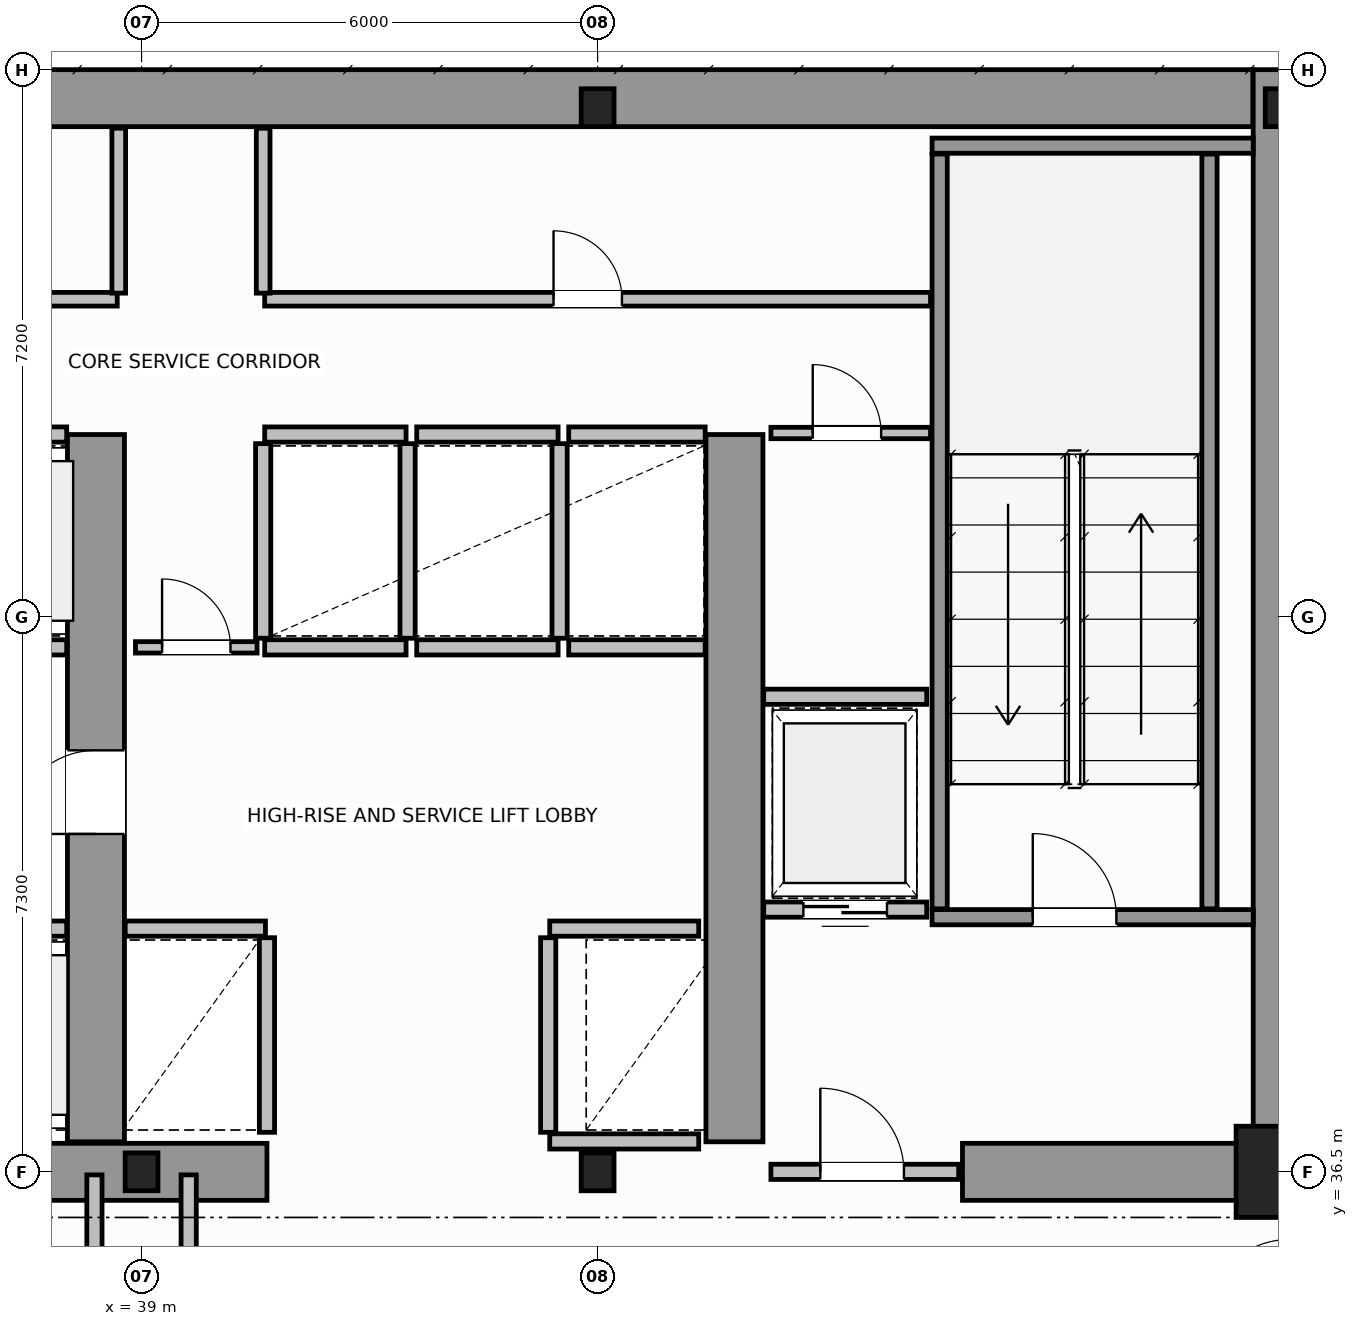
"""IFC4 building model, lengths in metres.
Left out: names, types, materials, properties, quantities, classifications, styles, units other than length and angle.
Written with IfcOpenShell. Run it as: python <this file> out.ifc"""

import sys

from ifc_helpers import new_model, si_unit, direction, frame, frame_2d, origin, origin_2d, place, context, subcontext, project, spatial, rectangle, i_section, extrude, source, transform, mapped, element, fill, save


model = new_model("IFC4")
c1 = context("Model", 3, precision=1e-05, world=origin(), true_north=direction((0.0, 1.0)))
c2 = subcontext(c1, "Body", "Model", "MODEL_VIEW")
j1 = project(units=[si_unit("LENGTHUNIT", "METRE"), si_unit("PLANEANGLEUNIT", "RADIAN")], contexts=[c1])
p1 = place(None, origin())
s1 = spatial("IfcSite", under=j1, at=p1, CompositionType="ELEMENT")
p2 = place(p1, origin())
s2 = spatial("IfcBuilding", under=s1, at=p2, CompositionType="ELEMENT")
p3 = place(p2, frame((0.0, 0.0, 149.0)))
s3 = spatial("IfcBuildingStorey", under=s2, at=p3, CompositionType="ELEMENT", Elevation=149.0)
m1 = source(origin(), c2, "Body", "SweptSolid", [
    extrude(i_section(OverallWidth=0.432, OverallDepth=0.498, WebThickness=0.055, FlangeThickness=0.068, FilletRadius=0.015, at=origin_2d()), origin(), (0.0, 0.0, 1.0), 4.8),
])
for number, where, z_axis, x_axis in (
    (1, (39.0, 36.5, 0.0), (0.0, 0.0, 1.0), (1.0, 0.0, 0.0)),
    (2, (45.0, 36.5, 0.0), (0.0, 0.0, 1.0), (1.0, 0.0, 0.0)),
):
    element("IfcColumn", number, at=place(p3, frame(where, z_axis=z_axis, x_axis=x_axis)), inside=s3, PredefinedType="COLUMN", context=c2, shape_type="MappedRepresentation", body=[
        mapped(m1, transform((0.0, 0.0, 0.0), scale=1.0)),
    ])
m2 = source(origin(), c2, "Body", "SweptSolid", [
    extrude(rectangle(XDim=1.2, YDim=1.2, at=origin_2d()), origin(), (0.0, 0.0, 1.0), 4.8),
])
p4 = place(p3, frame((54.0, 36.5, 0.0), z_axis=(0.0, 0.0, 1.0), x_axis=(1.0, 0.0, 0.0)))
e3 = element("IfcColumn", 3, at=p4, inside=s3, PredefinedType="COLUMN", context=c2, shape_type="MappedRepresentation", body=[
    mapped(m2, transform((0.0, 0.0, 0.0), scale=1.0)),
])
for number, where, z_axis, x_axis in (
    (4, (45.0, 50.5, 0.0), (0.0, 0.0, 1.0), (1.0, 0.0, 0.0)),
    (5, (54.0, 50.5, 0.0), (0.0, 0.0, 1.0), (1.0, 0.0, 0.0)),
):
    element("IfcColumn", number, at=place(p3, frame(where, z_axis=z_axis, x_axis=x_axis)), inside=s3, PredefinedType="COLUMN", context=c2, shape_type="MappedRepresentation", body=[
        mapped(m1, transform((0.0, 0.0, 0.0), scale=1.0)),
    ])
p5 = place(p3, frame((34.002, 50.625, 0.0), z_axis=(0.0, 0.0, 1.0), x_axis=(1.0, 0.0, 0.0)))
e6 = element("IfcWall", 6, at=p5, inside=s3, PredefinedType="SHEAR", context=c2, shape_type="SweptSolid", body=[
    extrude(rectangle(XDim=19.619, YDim=0.75, at=frame_2d((9.81, 0.0))), origin(), (0.0, 0.0, 1.0), 4.8),
])
p6 = place(p3, frame((54.0, 36.5, 0.0), z_axis=(0.0, 0.0, 1.0), x_axis=(0.0, 1.0, 0.0)))
e7 = element("IfcWall", 7, at=p6, inside=s3, PredefinedType="SHEAR", context=c2, shape_type="SweptSolid", body=[
    extrude(rectangle(XDim=14.5, YDim=0.75, at=frame_2d((7.25, 0.0))), origin(), (0.0, 0.0, 1.0), 4.8),
])
p7 = place(p3, frame((36.15, 36.5, 0.0), z_axis=(0.0, 0.0, 1.0), x_axis=(1.0, 0.0, 0.0)))
e8 = element("IfcWall", 8, at=p7, inside=s3, PredefinedType="SHEAR", context=c2, shape_type="SweptSolid", body=[
    extrude(rectangle(XDim=4.5, YDim=0.75, at=frame_2d((2.25, 0.0))), origin(), (0.0, 0.0, 1.0), 4.8),
])
p8 = place(p3, frame((49.8, 36.5, 0.0), z_axis=(0.0, 0.0, 1.0), x_axis=(1.0, 0.0, 0.0)))
e9 = element("IfcWall", 9, at=p8, inside=s3, PredefinedType="SHEAR", context=c2, shape_type="SweptSolid", body=[
    extrude(rectangle(XDim=3.805, YDim=0.75, at=frame_2d((1.902, 0.0))), origin(), (0.0, 0.0, 1.0), 3.34),
])
p9 = place(p3, frame((38.4, 36.895, 0.0), z_axis=(0.0, 0.0, 1.0), x_axis=(0.0, 1.0, 0.0)))
e10 = element("IfcWall", 10, at=p9, inside=s3, PredefinedType="SHEAR", context=c2, shape_type="SweptSolid", body=[
    extrude(rectangle(XDim=9.305, YDim=0.75, at=frame_2d((4.652, 0.0))), origin(), (0.0, 0.0, 1.0), 4.8),
])
p10 = place(p9, frame((4.05, 0.0, 0.0)))
e11 = element("IfcOpeningElement", 11, at=p10, cuts=e10, PredefinedType="OPENING", context=c2, shape_type="SweptSolid", body=[
    extrude(rectangle(XDim=1.1, YDim=2.15, at=frame_2d((0.55, 1.075))), frame((0.0, 0.385, 0.0), z_axis=(0.0, -1.0, 0.0), x_axis=(1.0, 0.0, 0.0)), (0.0, 0.0, 1.0), 0.77),
])
p11 = place(p3, frame((46.8, 36.895, 0.0), z_axis=(0.0, 0.0, 1.0), x_axis=(0.0, 1.0, 0.0)))
e12 = element("IfcWall", 12, at=p11, inside=s3, PredefinedType="SHEAR", context=c2, shape_type="SweptSolid", body=[
    extrude(rectangle(XDim=9.305, YDim=0.75, at=frame_2d((4.652, 0.0))), origin(), (0.0, 0.0, 1.0), 4.8),
])
p12 = place(p3, frame((49.4, 39.85, 0.0), z_axis=(0.0, 0.0, 1.0), x_axis=(1.0, 0.0, 0.0)))
e13 = element("IfcWall", 13, at=p12, inside=s3, PredefinedType="SOLIDWALL", context=c2, shape_type="SweptSolid", body=[
    extrude(rectangle(XDim=4.225, YDim=0.2, at=frame_2d((2.113, 0.0))), origin(), (0.0, 0.0, 1.0), 4.8),
])
p13 = place(p12, frame((1.325, 0.0, 0.0)))
e14 = element("IfcOpeningElement", 14, at=p13, cuts=e13, PredefinedType="OPENING", context=c2, shape_type="SweptSolid", body=[
    extrude(rectangle(XDim=1.1, YDim=2.15, at=frame_2d((0.55, 1.075))), frame((0.0, 0.11, 0.0), z_axis=(0.0, -1.0, 0.0), x_axis=(1.0, 0.0, 0.0)), (0.0, 0.0, 1.0), 0.22),
])
p14 = place(p3, frame((49.4, 50.0, 0.0), z_axis=(0.0, 0.0, 1.0), x_axis=(1.0, 0.0, 0.0)))
e15 = element("IfcWall", 15, at=p14, inside=s3, PredefinedType="SOLIDWALL", context=c2, shape_type="SweptSolid", body=[
    extrude(rectangle(XDim=4.225, YDim=0.2, at=frame_2d((2.113, 0.0))), origin(), (0.0, 0.0, 1.0), 4.8),
])
for number, where, z_axis, x_axis in (
    (16, (49.5, 39.96, 0.0), (0.0, 0.0, 1.0), (0.0, 1.0, 0.0)),
    (17, (53.05, 39.96, 0.0), (0.0, 0.0, 1.0), (0.0, 1.0, 0.0)),
):
    element("IfcWall", number, at=place(p3, frame(where, z_axis=z_axis, x_axis=x_axis)), inside=s3, PredefinedType="SOLIDWALL", context=c2, shape_type="SweptSolid", body=[
        extrude(rectangle(XDim=9.93, YDim=0.2, at=frame_2d((4.965, 0.0))), origin(), (0.0, 0.0, 1.0), 4.8),
    ])
p15 = place(p3, frame((47.28, 36.5, 0.0), z_axis=(0.0, 0.0, 1.0), x_axis=(1.0, 0.0, 0.0)))
e18 = element("IfcWall", 18, at=p15, inside=s3, PredefinedType="SOLIDWALL", context=c2, shape_type="SweptSolid", body=[
    extrude(rectangle(XDim=2.47, YDim=0.2, at=frame_2d((1.235, 0.0))), origin(), (0.0, 0.0, 1.0), 3.33),
])
p16 = place(p15, frame((0.65, 0.0, 0.0)))
e19 = element("IfcOpeningElement", 19, at=p16, cuts=e18, PredefinedType="OPENING", context=c2, shape_type="SweptSolid", body=[
    extrude(rectangle(XDim=1.1, YDim=2.15, at=frame_2d((0.55, 1.075))), frame((0.0, 0.11, 0.0), z_axis=(0.0, -1.0, 0.0), x_axis=(1.0, 0.0, 0.0)), (0.0, 0.0, 1.0), 0.22),
])
p17 = place(p3, frame((36.17, 39.7, 0.0), z_axis=(0.0, 0.0, 1.0), x_axis=(1.0, 0.0, 0.0)))
e20 = element("IfcWall", 20, at=p17, inside=s3, PredefinedType="SOLIDWALL", context=c2, shape_type="SweptSolid", body=[
    extrude(rectangle(XDim=1.845, YDim=0.2, at=frame_2d((0.922, 0.0))), origin(), (0.0, 0.0, 1.0), 4.54),
])
p18 = place(p17, frame((0.372, 0.0, 0.0)))
e21 = element("IfcOpeningElement", 21, at=p18, cuts=e20, PredefinedType="OPENING", context=c2, shape_type="SweptSolid", body=[
    extrude(rectangle(XDim=1.1, YDim=2.15, at=frame_2d((0.55, 1.075))), frame((0.0, 0.11, 0.0), z_axis=(0.0, -1.0, 0.0), x_axis=(1.0, 0.0, 0.0)), (0.0, 0.0, 1.0), 0.22),
])
p19 = place(p3, frame((36.29, 43.4, 0.0), z_axis=(0.0, 0.0, 1.0), x_axis=(1.0, 0.0, 0.0)))
e22 = element("IfcWall", 22, at=p19, inside=s3, PredefinedType="SOLIDWALL", context=c2, shape_type="SweptSolid", body=[
    extrude(rectangle(XDim=1.725, YDim=0.2, at=frame_2d((0.862, 0.0))), origin(), (0.0, 0.0, 1.0), 4.54),
])
p20 = place(p19, frame((0.313, 0.0, 0.0)))
e23 = element("IfcOpeningElement", 23, at=p20, cuts=e22, PredefinedType="OPENING", context=c2, shape_type="SweptSolid", body=[
    extrude(rectangle(XDim=1.1, YDim=2.15, at=frame_2d((0.55, 1.075))), frame((0.0, 0.11, 0.0), z_axis=(0.0, -1.0, 0.0), x_axis=(1.0, 0.0, 0.0)), (0.0, 0.0, 1.0), 0.22),
])
p21 = place(p3, frame((36.29, 46.2, 0.0), z_axis=(0.0, 0.0, 1.0), x_axis=(1.0, 0.0, 0.0)))
e24 = element("IfcWall", 24, at=p21, inside=s3, PredefinedType="SOLIDWALL", context=c2, shape_type="SweptSolid", body=[
    extrude(rectangle(XDim=1.725, YDim=0.2, at=frame_2d((0.862, 0.0))), origin(), (0.0, 0.0, 1.0), 4.54),
])
p22 = place(p3, frame((38.785, 39.7, 0.0), z_axis=(0.0, 0.0, 1.0), x_axis=(1.0, 0.0, 0.0)))
e25 = element("IfcWall", 25, at=p22, inside=s3, PredefinedType="SOLIDWALL", context=c2, shape_type="SweptSolid", body=[
    extrude(rectangle(XDim=1.845, YDim=0.2, at=frame_2d((0.922, 0.0))), origin(), (0.0, 0.0, 1.0), 4.54),
])
p23 = place(p3, frame((40.65, 37.02, 0.0), z_axis=(0.0, 0.0, 1.0), x_axis=(0.0, 1.0, 0.0)))
e26 = element("IfcWall", 26, at=p23, inside=s3, PredefinedType="SOLIDWALL", context=c2, shape_type="SweptSolid", body=[
    extrude(rectangle(XDim=2.56, YDim=0.2, at=frame_2d((1.28, 0.0))), origin(), (0.0, 0.0, 1.0), 4.54),
])
p24 = place(p3, frame((44.37, 39.7, 0.0), z_axis=(0.0, 0.0, 1.0), x_axis=(1.0, 0.0, 0.0)))
e27 = element("IfcWall", 27, at=p24, inside=s3, PredefinedType="SOLIDWALL", context=c2, shape_type="SweptSolid", body=[
    extrude(rectangle(XDim=1.96, YDim=0.2, at=frame_2d((0.98, 0.0))), origin(), (0.0, 0.0, 1.0), 4.54),
])
p25 = place(p3, frame((44.37, 36.9, 0.0), z_axis=(0.0, 0.0, 1.0), x_axis=(1.0, 0.0, 0.0)))
e28 = element("IfcWall", 28, at=p25, inside=s3, PredefinedType="SOLIDWALL", context=c2, shape_type="SweptSolid", body=[
    extrude(rectangle(XDim=1.96, YDim=0.2, at=frame_2d((0.98, 0.0))), origin(), (0.0, 0.0, 1.0), 3.33),
])
p26 = place(p3, frame((44.35, 37.02, 0.0), z_axis=(0.0, 0.0, 1.0), x_axis=(0.0, 1.0, 0.0)))
e29 = element("IfcWall", 29, at=p26, inside=s3, PredefinedType="SOLIDWALL", context=c2, shape_type="SweptSolid", body=[
    extrude(rectangle(XDim=2.56, YDim=0.2, at=frame_2d((1.28, 0.0))), origin(), (0.0, 0.0, 1.0), 4.54),
])
for number, where, z_axis, x_axis in (
    (30, (40.62, 43.4, 0.0), (0.0, 0.0, 1.0), (1.0, 0.0, 0.0)),
    (31, (40.62, 46.2, 0.0), (0.0, 0.0, 1.0), (1.0, 0.0, 0.0)),
):
    element("IfcWall", number, at=place(p3, frame(where, z_axis=z_axis, x_axis=x_axis)), inside=s3, PredefinedType="SOLIDWALL", context=c2, shape_type="SweptSolid", body=[
        extrude(rectangle(XDim=1.86, YDim=0.2, at=frame_2d((0.93, 0.0))), origin(), (0.0, 0.0, 1.0), 4.54),
    ])
for number, where, z_axis, x_axis in (
    (32, (40.6, 43.52, 0.0), (0.0, 0.0, 1.0), (0.0, 1.0, 0.0)),
    (33, (42.5, 43.52, 0.0), (0.0, 0.0, 1.0), (0.0, 1.0, 0.0)),
):
    element("IfcWall", number, at=place(p3, frame(where, z_axis=z_axis, x_axis=x_axis)), inside=s3, PredefinedType="SOLIDWALL", context=c2, shape_type="SweptSolid", body=[
        extrude(rectangle(XDim=2.56, YDim=0.2, at=frame_2d((1.28, 0.0))), origin(), (0.0, 0.0, 1.0), 4.54),
    ])
for number, where, z_axis, x_axis in (
    (34, (42.62, 43.4, 0.0), (0.0, 0.0, 1.0), (1.0, 0.0, 0.0)),
    (35, (42.62, 46.2, 0.0), (0.0, 0.0, 1.0), (1.0, 0.0, 0.0)),
):
    element("IfcWall", number, at=place(p3, frame(where, z_axis=z_axis, x_axis=x_axis)), inside=s3, PredefinedType="SOLIDWALL", context=c2, shape_type="SweptSolid", body=[
        extrude(rectangle(XDim=1.86, YDim=0.2, at=frame_2d((0.93, 0.0))), origin(), (0.0, 0.0, 1.0), 4.54),
    ])
p27 = place(p3, frame((44.5, 43.52, 0.0), z_axis=(0.0, 0.0, 1.0), x_axis=(0.0, 1.0, 0.0)))
e36 = element("IfcWall", 36, at=p27, inside=s3, PredefinedType="SOLIDWALL", context=c2, shape_type="SweptSolid", body=[
    extrude(rectangle(XDim=2.56, YDim=0.2, at=frame_2d((1.28, 0.0))), origin(), (0.0, 0.0, 1.0), 3.33),
])
for number, where, z_axis, x_axis in (
    (37, (44.62, 43.4, 0.0), (0.0, 0.0, 1.0), (1.0, 0.0, 0.0)),
    (38, (44.62, 46.2, 0.0), (0.0, 0.0, 1.0), (1.0, 0.0, 0.0)),
):
    element("IfcWall", number, at=place(p3, frame(where, z_axis=z_axis, x_axis=x_axis)), inside=s3, PredefinedType="SOLIDWALL", context=c2, shape_type="SweptSolid", body=[
        extrude(rectangle(XDim=1.795, YDim=0.2, at=frame_2d((0.897, 0.0))), origin(), (0.0, 0.0, 1.0), 4.54),
    ])
p28 = place(p3, frame((47.185, 39.95, 0.0), z_axis=(0.0, 0.0, 1.0), x_axis=(1.0, 0.0, 0.0)))
e39 = element("IfcWall", 39, at=p28, inside=s3, PredefinedType="SOLIDWALL", context=c2, shape_type="SweptSolid", body=[
    extrude(rectangle(XDim=2.145, YDim=0.2, at=frame_2d((1.073, 0.0))), origin(), (0.0, 0.0, 1.0), 4.54),
])
p29 = place(p28, frame((0.522, 0.0, 0.0)))
e40 = element("IfcOpeningElement", 40, at=p29, cuts=e39, PredefinedType="OPENING", context=c2, shape_type="SweptSolid", body=[
    extrude(rectangle(XDim=1.1, YDim=2.15, at=frame_2d((0.55, 1.075))), frame((0.0, 0.11, 0.0), z_axis=(0.0, -1.0, 0.0), x_axis=(1.0, 0.0, 0.0)), (0.0, 0.0, 1.0), 0.22),
])
p30 = place(p3, frame((47.185, 42.75, 0.0), z_axis=(0.0, 0.0, 1.0), x_axis=(1.0, 0.0, 0.0)))
e41 = element("IfcWall", 41, at=p30, inside=s3, PredefinedType="SOLIDWALL", context=c2, shape_type="SweptSolid", body=[
    extrude(rectangle(XDim=2.145, YDim=0.2, at=frame_2d((1.073, 0.0))), origin(), (0.0, 0.0, 1.0), 4.54),
])
p31 = place(p3, frame((47.28, 46.22, 0.0), z_axis=(0.0, 0.0, 1.0), x_axis=(1.0, 0.0, 0.0)))
e42 = element("IfcWall", 42, at=p31, inside=s3, PredefinedType="PARTITIONING", context=c2, shape_type="SweptSolid", body=[
    extrude(rectangle(XDim=2.1, YDim=0.15, at=frame_2d((1.05, 0.0))), origin(), (0.0, 0.0, 1.0), 4.54),
])
p32 = place(p31, frame((0.55, 0.0, 0.0)))
e43 = element("IfcOpeningElement", 43, at=p32, cuts=e42, PredefinedType="OPENING", context=c2, shape_type="SweptSolid", body=[
    extrude(rectangle(XDim=0.9, YDim=2.1, at=frame_2d((0.45, 1.05))), frame((0.0, 0.085, 0.0), z_axis=(0.0, -1.0, 0.0), x_axis=(1.0, 0.0, 0.0)), (0.0, 0.0, 1.0), 0.17),
])
p33 = place(p3, frame((38.92, 43.4, 0.0), z_axis=(0.0, 0.0, 1.0), x_axis=(1.0, 0.0, 0.0)))
e44 = element("IfcWall", 44, at=p33, inside=s3, PredefinedType="PARTITIONING", context=c2, shape_type="SweptSolid", body=[
    extrude(rectangle(XDim=1.6, YDim=0.15, at=frame_2d((0.8, 0.0))), origin(), (0.0, 0.0, 1.0), 4.54),
])
p34 = place(p33, frame((0.35, 0.0, 0.0)))
e45 = element("IfcOpeningElement", 45, at=p34, cuts=e44, PredefinedType="OPENING", context=c2, shape_type="SweptSolid", body=[
    extrude(rectangle(XDim=0.9, YDim=2.1, at=frame_2d((0.45, 1.05))), frame((0.0, 0.085, 0.0), z_axis=(0.0, -1.0, 0.0), x_axis=(1.0, 0.0, 0.0)), (0.0, 0.0, 1.0), 0.17),
])
p35 = place(p3, frame((18.62, 47.98, 0.0), z_axis=(0.0, 0.0, 1.0), x_axis=(1.0, 0.0, 0.0)))
e46 = element("IfcWall", 46, at=p35, inside=s3, PredefinedType="PLUMBINGWALL", context=c2, shape_type="SweptSolid", body=[
    extrude(rectangle(XDim=20.06, YDim=0.18, at=frame_2d((10.03, 0.0))), origin(), (0.0, 0.0, 1.0), 4.54),
])
p36 = place(p35, frame((3.5, 0.0, 0.0)))
e47 = element("IfcOpeningElement", 47, at=p36, cuts=e46, PredefinedType="OPENING", context=c2, shape_type="SweptSolid", body=[
    extrude(rectangle(XDim=0.9, YDim=2.15, at=frame_2d((0.45, 1.075))), frame((0.0, 0.1, 0.0), z_axis=(0.0, -1.0, 0.0), x_axis=(1.0, 0.0, 0.0)), (0.0, 0.0, 1.0), 0.2),
])
p37 = place(p35, frame((10.8, 0.0, 0.0)))
e48 = element("IfcOpeningElement", 48, at=p37, cuts=e46, PredefinedType="OPENING", context=c2, shape_type="SweptSolid", body=[
    extrude(rectangle(XDim=0.9, YDim=2.15, at=frame_2d((0.45, 1.075))), frame((0.0, 0.1, 0.0), z_axis=(0.0, -1.0, 0.0), x_axis=(1.0, 0.0, 0.0)), (0.0, 0.0, 1.0), 0.2),
])
p38 = place(p35, frame((16.8, 0.0, 0.0)))
e49 = element("IfcOpeningElement", 49, at=p38, cuts=e46, PredefinedType="OPENING", context=c2, shape_type="SweptSolid", body=[
    extrude(rectangle(XDim=0.9, YDim=2.15, at=frame_2d((0.45, 1.075))), frame((0.0, 0.1, 0.0), z_axis=(0.0, -1.0, 0.0), x_axis=(1.0, 0.0, 0.0)), (0.0, 0.0, 1.0), 0.2),
])
p39 = place(p3, frame((40.62, 47.98, 0.0), z_axis=(0.0, 0.0, 1.0), x_axis=(1.0, 0.0, 0.0)))
e50 = element("IfcWall", 50, at=p39, inside=s3, PredefinedType="PLUMBINGWALL", context=c2, shape_type="SweptSolid", body=[
    extrude(rectangle(XDim=8.76, YDim=0.18, at=frame_2d((4.38, 0.0))), origin(), (0.0, 0.0, 1.0), 4.54),
])
p40 = place(p39, frame((3.8, 0.0, 0.0)))
e51 = element("IfcOpeningElement", 51, at=p40, cuts=e50, PredefinedType="OPENING", context=c2, shape_type="SweptSolid", body=[
    extrude(rectangle(XDim=0.9, YDim=2.15, at=frame_2d((0.45, 1.075))), frame((0.0, 0.1, 0.0), z_axis=(0.0, -1.0, 0.0), x_axis=(1.0, 0.0, 0.0)), (0.0, 0.0, 1.0), 0.2),
])
for number, where, z_axis, x_axis in (
    (52, (38.7, 48.06, 0.0), (0.0, 0.0, 1.0), (0.0, 1.0, 0.0)),
    (53, (40.6, 48.06, 0.0), (0.0, 0.0, 1.0), (0.0, 1.0, 0.0)),
):
    element("IfcWall", number, at=place(p3, frame(where, z_axis=z_axis, x_axis=x_axis)), inside=s3, PredefinedType="PLUMBINGWALL", context=c2, shape_type="SweptSolid", body=[
        extrude(rectangle(XDim=2.17, YDim=0.18, at=frame_2d((1.085, 0.0))), origin(), (0.0, 0.0, 1.0), 4.54),
    ])
for number, where, z_axis, x_axis in (
    (54, (38.38, 28.16, 0.0), (0.0, 0.0, 1.0), (0.0, 1.0, 0.0)),
    (55, (39.62, 28.16, 0.0), (0.0, 0.0, 1.0), (0.0, 1.0, 0.0)),
):
    element("IfcWall", number, at=place(p3, frame(where, z_axis=z_axis, x_axis=x_axis)), inside=s3, PredefinedType="SOLIDWALL", context=c2, shape_type="SweptSolid", body=[
        extrude(rectangle(XDim=8.3, YDim=0.2, at=frame_2d((4.15, 0.0))), origin(), (0.0, 0.0, 1.0), 4.54),
    ])
m3 = source(origin(), c2, "Body", "SweptSolid", [
    extrude(rectangle(XDim=1.1, YDim=2.15, at=frame_2d((0.55, 1.075))), frame((0.0, 0.025, 0.0), z_axis=(0.0, -1.0, 0.0), x_axis=(1.0, 0.0, 0.0)), (0.0, 0.0, 1.0), 0.05),
])
p41 = place(p13, origin())
e56 = element("IfcDoor", 56, at=p41, inside=s3, OperationType="SINGLE_SWING_RIGHT", PredefinedType="DOOR", context=c2, shape_type="MappedRepresentation", body=[
    mapped(m3, transform((0.0, 0.0, 0.0), scale=1.0)),
])
fill(e14, e56)
p42 = place(p16, origin())
e57 = element("IfcDoor", 57, at=p42, inside=s3, OperationType="SINGLE_SWING_LEFT", PredefinedType="DOOR", context=c2, shape_type="MappedRepresentation", body=[
    mapped(m3, transform((0.0, 0.0, 0.0), scale=1.0)),
])
fill(e19, e57)
p43 = place(p29, origin())
e58 = element("IfcDoor", 58, at=p43, inside=s3, OperationType="DOUBLE_DOOR_SLIDING", PredefinedType="DOOR", context=c2, shape_type="MappedRepresentation", body=[
    mapped(m3, transform((0.0, 0.0, 0.0), scale=1.0)),
])
fill(e40, e58)
p44 = place(p10, origin())
e59 = element("IfcDoor", 59, at=p44, inside=s3, OperationType="SINGLE_SWING_RIGHT", PredefinedType="DOOR", context=c2, shape_type="MappedRepresentation", body=[
    mapped(m3, transform((0.0, 0.0, 0.0), scale=1.0)),
])
fill(e11, e59)
m4 = source(origin(), c2, "Body", "SweptSolid", [
    extrude(rectangle(XDim=0.9, YDim=2.1, at=frame_2d((0.45, 1.05))), frame((0.0, 0.025, 0.0), z_axis=(0.0, -1.0, 0.0), x_axis=(1.0, 0.0, 0.0)), (0.0, 0.0, 1.0), 0.05),
])
p45 = place(p32, origin())
e60 = element("IfcDoor", 60, at=p45, inside=s3, OperationType="SINGLE_SWING_RIGHT", PredefinedType="DOOR", context=c2, shape_type="MappedRepresentation", body=[
    mapped(m4, transform((0.0, 0.0, 0.0), scale=1.0)),
])
fill(e43, e60)
p46 = place(p34, origin())
e61 = element("IfcDoor", 61, at=p46, inside=s3, OperationType="SINGLE_SWING_LEFT", PredefinedType="DOOR", context=c2, shape_type="MappedRepresentation", body=[
    mapped(m4, transform((0.0, 0.0, 0.0), scale=1.0)),
])
fill(e45, e61)
m5 = source(origin(), c2, "Body", "SweptSolid", [
    extrude(rectangle(XDim=0.9, YDim=2.15, at=frame_2d((0.45, 1.075))), frame((0.0, 0.025, 0.0), z_axis=(0.0, -1.0, 0.0), x_axis=(1.0, 0.0, 0.0)), (0.0, 0.0, 1.0), 0.05),
])
p47 = place(p40, origin())
e62 = element("IfcDoor", 62, at=p47, inside=s3, OperationType="SINGLE_SWING_RIGHT", PredefinedType="DOOR", context=c2, shape_type="MappedRepresentation", body=[
    mapped(m5, transform((0.0, 0.0, 0.0), scale=1.0)),
])
fill(e51, e62)
save(model, sys.argv[1])
